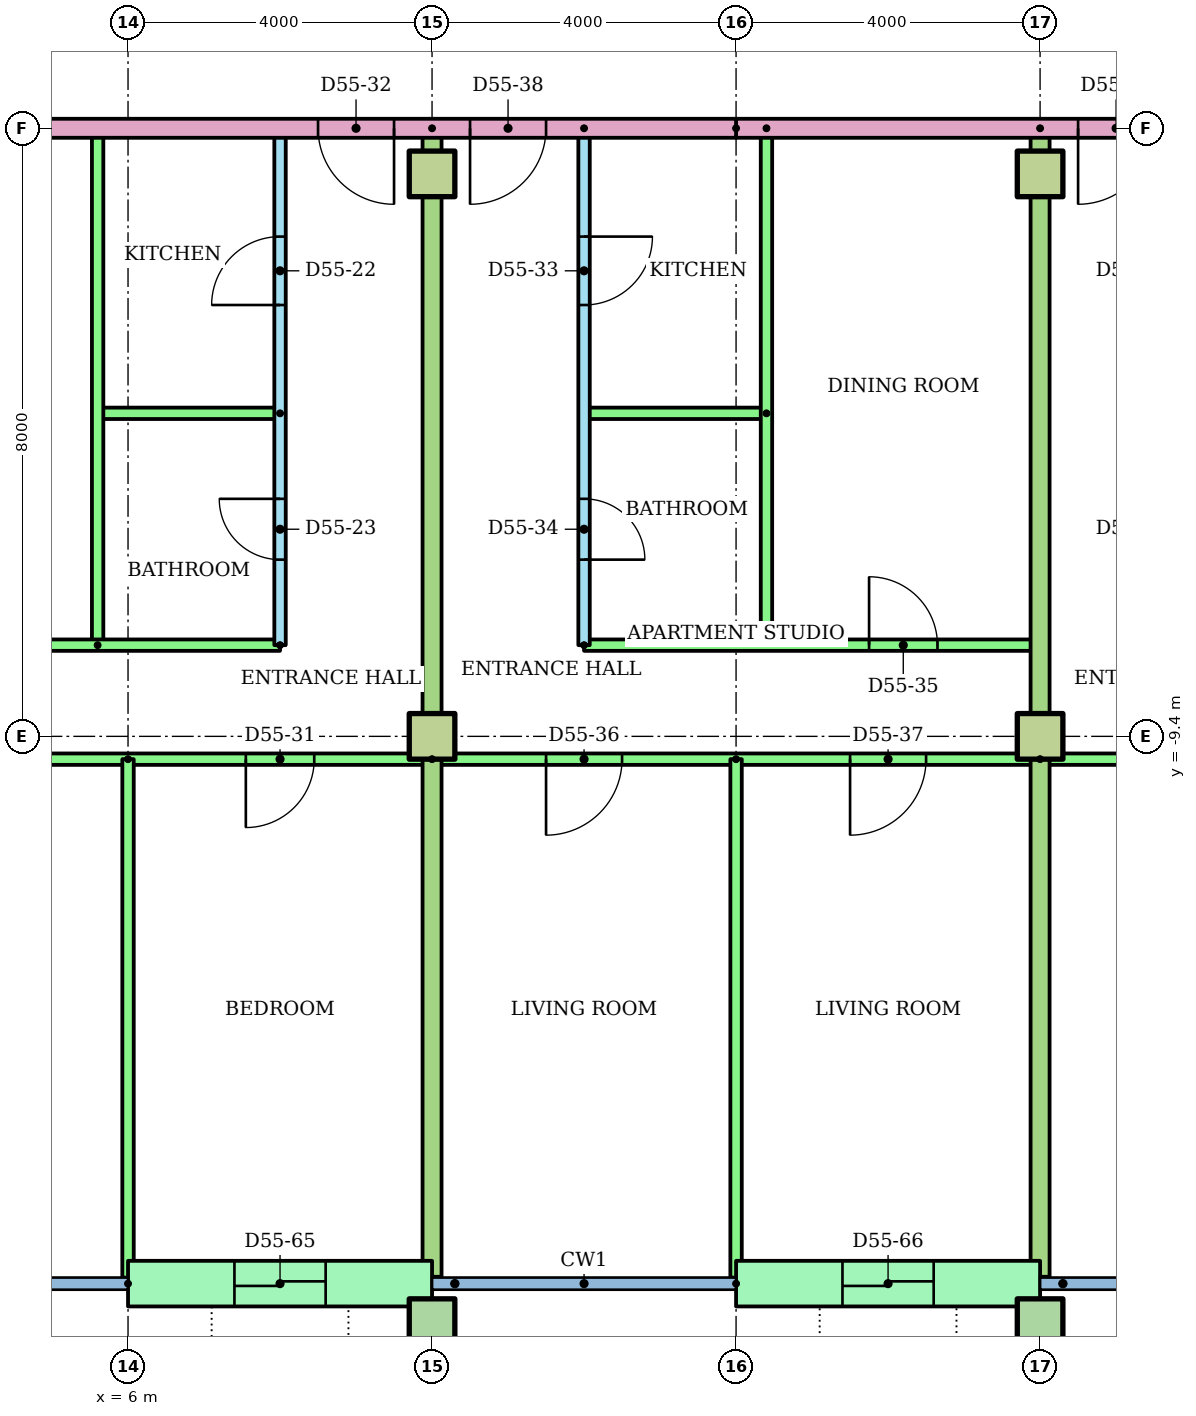
"""IFC4 building model, lengths in metres.
Left out: names, types, materials, properties, quantities, classifications, styles, units other than length and angle.
Written with IfcOpenShell. Run it as: python <this file> out.ifc"""

import sys

from ifc_helpers import new_model, si_unit, direction, frame, frame_2d, origin, origin_2d, place, context, subcontext, project, spatial, rectangle, hollow_rectangle, extrude, element, fill, save


model = new_model("IFC4")
c1 = context("Model", 3, precision=1e-05, world=origin(), true_north=direction((0.0, 1.0)))
c2 = subcontext(c1, "Body", "Model", "MODEL_VIEW")
j1 = project(units=[si_unit("LENGTHUNIT", "METRE"), si_unit("PLANEANGLEUNIT", "RADIAN")], contexts=[c1])
p1 = place(None, origin())
s1 = spatial("IfcSite", under=j1, at=p1, CompositionType="ELEMENT")
p2 = place(p1, origin())
s2 = spatial("IfcBuilding", under=s1, at=p2, CompositionType="ELEMENT")
p3 = place(p2, frame((0.0, 0.0, 214.0)))
s3 = spatial("IfcBuildingStorey", under=s2, at=p3, CompositionType="ELEMENT", Elevation=214.0)
for number, where in (
    (1, (10.0, -17.1, 0.0)),
    (2, (18.0, -17.1, 0.0)),
):
    element("IfcColumn", number, at=place(p3, frame(where)), inside=s3, PredefinedType="COLUMN", context=c2, shape_type="SweptSolid", body=[
        extrude(hollow_rectangle(XDim=0.6, YDim=0.6, WallThickness=0.03, at=origin_2d()), origin(), (0.0, 0.0, 1.0), 3.2),
    ])
for number, where in (
    (3, (10.0, -9.4, 0.0)),
    (4, (18.0, -9.4, 0.0)),
    (5, (10.0, -2.0, 0.0)),
    (6, (18.0, -2.0, 0.0)),
):
    element("IfcColumn", number, at=place(p3, frame(where)), inside=s3, PredefinedType="COLUMN", context=c2, shape_type="SweptSolid", body=[
        extrude(rectangle(XDim=0.6, YDim=0.6, at=origin_2d()), origin(), (0.0, 0.0, 1.0), 3.2),
    ])
p4 = place(p3, frame((6.0, -16.6, 0.0)))
e7 = element("IfcWall", 7, at=p4, inside=s3, PredefinedType="STANDARD", context=c2, shape_type="SweptSolid", body=[
    extrude(rectangle(XDim=4.0, YDim=0.6, at=frame_2d((2.0, 0.0))), origin(), (0.0, 0.0, 1.0), 2.92),
])
p5 = place(p4, frame((1.4, 0.0, 0.0)))
e8 = element("IfcOpeningElement", 8, at=p5, cuts=e7, PredefinedType="OPENING", context=c2, shape_type="SweptSolid", body=[
    extrude(rectangle(XDim=1.2, YDim=2.1, at=frame_2d((0.6, 1.05))), frame((0.0, 0.31, 0.0), z_axis=(0.0, -1.0, 0.0), x_axis=(1.0, 0.0, 0.0)), (0.0, 0.0, 1.0), 0.62),
])
p6 = place(p3, frame((14.0, -16.6, 0.0)))
e9 = element("IfcWall", 9, at=p6, inside=s3, PredefinedType="STANDARD", context=c2, shape_type="SweptSolid", body=[
    extrude(rectangle(XDim=4.0, YDim=0.6, at=frame_2d((2.0, 0.0))), origin(), (0.0, 0.0, 1.0), 2.92),
])
p7 = place(p6, frame((1.4, 0.0, 0.0)))
e10 = element("IfcOpeningElement", 10, at=p7, cuts=e9, PredefinedType="OPENING", context=c2, shape_type="SweptSolid", body=[
    extrude(rectangle(XDim=1.2, YDim=2.1, at=frame_2d((0.6, 1.05))), frame((0.0, 0.31, 0.0), z_axis=(0.0, -1.0, 0.0), x_axis=(1.0, 0.0, 0.0)), (0.0, 0.0, 1.0), 0.62),
])
p8 = place(p3, frame((8.0, -8.2, 0.0), z_axis=(0.0, 0.0, 1.0), x_axis=(0.0, 1.0, 0.0)))
e11 = element("IfcWall", 11, at=p8, inside=s3, PredefinedType="PARTITIONING", context=c2, shape_type="SweptSolid", body=[
    extrude(rectangle(XDim=6.8, YDim=0.15, at=frame_2d((3.4, 0.0))), origin(), (0.0, 0.0, 1.0), 2.4),
])
p9 = place(p8, frame((4.475, 0.0, 0.0)))
e12 = element("IfcOpeningElement", 12, at=p9, cuts=e11, PredefinedType="OPENING", context=c2, shape_type="SweptSolid", body=[
    extrude(rectangle(XDim=0.9, YDim=2.1, at=frame_2d((0.45, 1.05))), frame((0.0, 0.085, 0.0), z_axis=(0.0, -1.0, 0.0), x_axis=(1.0, 0.0, 0.0)), (0.0, 0.0, 1.0), 0.17),
])
p10 = place(p8, frame((1.125, 0.0, 0.0)))
e13 = element("IfcOpeningElement", 13, at=p10, cuts=e11, PredefinedType="OPENING", context=c2, shape_type="SweptSolid", body=[
    extrude(rectangle(XDim=0.8, YDim=2.1, at=frame_2d((0.4, 1.05))), frame((0.0, 0.085, 0.0), z_axis=(0.0, -1.0, 0.0), x_axis=(1.0, 0.0, 0.0)), (0.0, 0.0, 1.0), 0.17),
])
p11 = place(p3, frame((8.0, -5.15, 0.0), z_axis=(0.0, 0.0, 1.0), x_axis=(-1.0, 0.0, 0.0)))
e14 = element("IfcWall", 14, at=p11, inside=s3, PredefinedType="PARTITIONING", context=c2, shape_type="SweptSolid", body=[
    extrude(rectangle(XDim=2.4, YDim=0.15, at=frame_2d((1.2, 0.0))), origin(), (0.0, 0.0, 1.0), 2.4),
])
p12 = place(p3, frame((5.6, -8.2, 0.0), z_axis=(0.0, 0.0, 1.0), x_axis=(0.0, 1.0, 0.0)))
e15 = element("IfcWall", 15, at=p12, inside=s3, PredefinedType="PARTITIONING", context=c2, shape_type="SweptSolid", body=[
    extrude(rectangle(XDim=6.8, YDim=0.15, at=frame_2d((3.4, 0.0))), origin(), (0.0, 0.0, 1.0), 2.4),
])
p13 = place(p3, frame((-14.0, -8.2, 0.0)))
e16 = element("IfcWall", 16, at=p13, inside=s3, PredefinedType="PARTITIONING", context=c2, shape_type="SweptSolid", body=[
    extrude(rectangle(XDim=22.0, YDim=0.15, at=frame_2d((11.0, 0.0))), origin(), (0.0, 0.0, 1.0), 2.4),
])
p14 = place(p13, frame((14.624, 0.0, 0.0)))
e17 = element("IfcOpeningElement", 17, at=p14, cuts=e16, PredefinedType="OPENING", context=c2, shape_type="SweptSolid", body=[
    extrude(rectangle(XDim=0.9, YDim=2.1, at=frame_2d((0.45, 1.05))), frame((0.0, 0.085, 0.0), z_axis=(0.0, -1.0, 0.0), x_axis=(1.0, 0.0, 0.0)), (0.0, 0.0, 1.0), 0.17),
])
p15 = place(p13, frame((8.476, 0.0, 0.0)))
e18 = element("IfcOpeningElement", 18, at=p15, cuts=e16, PredefinedType="OPENING", context=c2, shape_type="SweptSolid", body=[
    extrude(rectangle(XDim=0.9, YDim=2.1, at=frame_2d((0.45, 1.05))), frame((0.0, 0.085, 0.0), z_axis=(0.0, -1.0, 0.0), x_axis=(1.0, 0.0, 0.0)), (0.0, 0.0, 1.0), 0.17),
])
p16 = place(p13, frame((1.975, 0.0, 0.0)))
e19 = element("IfcOpeningElement", 19, at=p16, cuts=e16, PredefinedType="OPENING", context=c2, shape_type="SweptSolid", body=[
    extrude(rectangle(XDim=0.9, YDim=2.1, at=frame_2d((0.45, 1.05))), frame((0.0, 0.085, 0.0), z_axis=(0.0, -1.0, 0.0), x_axis=(1.0, 0.0, 0.0)), (0.0, 0.0, 1.0), 0.17),
])
p17 = place(p3, frame((10.0, -9.7, 0.0), z_axis=(0.0, 0.0, 1.0), x_axis=(-1.0, 0.0, 0.0)))
e20 = element("IfcWall", 20, at=p17, inside=s3, PredefinedType="PARTITIONING", context=c2, shape_type="SweptSolid", body=[
    extrude(rectangle(XDim=24.0, YDim=0.15, at=frame_2d((12.0, 0.0))), origin(), (0.0, 0.0, 1.0), 2.4),
])
p18 = place(p17, frame((21.55, 0.0, 0.0)))
e21 = element("IfcOpeningElement", 21, at=p18, cuts=e20, PredefinedType="OPENING", context=c2, shape_type="SweptSolid", body=[
    extrude(rectangle(XDim=0.9, YDim=2.1, at=frame_2d((0.45, 1.05))), frame((0.0, 0.085, 0.0), z_axis=(0.0, -1.0, 0.0), x_axis=(1.0, 0.0, 0.0)), (0.0, 0.0, 1.0), 0.17),
])
p19 = place(p17, frame((17.55, 0.0, 0.0)))
e22 = element("IfcOpeningElement", 22, at=p19, cuts=e20, PredefinedType="OPENING", context=c2, shape_type="SweptSolid", body=[
    extrude(rectangle(XDim=0.9, YDim=2.1, at=frame_2d((0.45, 1.05))), frame((0.0, 0.085, 0.0), z_axis=(0.0, -1.0, 0.0), x_axis=(1.0, 0.0, 0.0)), (0.0, 0.0, 1.0), 0.17),
])
p20 = place(p17, frame((11.5, 0.0, 0.0)))
e23 = element("IfcOpeningElement", 23, at=p20, cuts=e20, PredefinedType="OPENING", context=c2, shape_type="SweptSolid", body=[
    extrude(rectangle(XDim=1.0, YDim=2.1, at=frame_2d((0.5, 1.05))), frame((0.0, 0.085, 0.0), z_axis=(0.0, -1.0, 0.0), x_axis=(1.0, 0.0, 0.0)), (0.0, 0.0, 1.0), 0.17),
])
p21 = place(p17, frame((5.55, 0.0, 0.0)))
e24 = element("IfcOpeningElement", 24, at=p21, cuts=e20, PredefinedType="OPENING", context=c2, shape_type="SweptSolid", body=[
    extrude(rectangle(XDim=0.9, YDim=2.1, at=frame_2d((0.45, 1.05))), frame((0.0, 0.085, 0.0), z_axis=(0.0, -1.0, 0.0), x_axis=(1.0, 0.0, 0.0)), (0.0, 0.0, 1.0), 0.17),
])
p22 = place(p17, frame((1.55, 0.0, 0.0)))
e25 = element("IfcOpeningElement", 25, at=p22, cuts=e20, PredefinedType="OPENING", context=c2, shape_type="SweptSolid", body=[
    extrude(rectangle(XDim=0.9, YDim=2.1, at=frame_2d((0.45, 1.05))), frame((0.0, 0.085, 0.0), z_axis=(0.0, -1.0, 0.0), x_axis=(1.0, 0.0, 0.0)), (0.0, 0.0, 1.0), 0.17),
])
p23 = place(p3, frame((6.0, -9.7, 0.0), z_axis=(0.0, 0.0, 1.0), x_axis=(0.0, -1.0, 0.0)))
e26 = element("IfcWall", 26, at=p23, inside=s3, PredefinedType="PARTITIONING", context=c2, shape_type="SweptSolid", body=[
    extrude(rectangle(XDim=6.821, YDim=0.15, at=frame_2d((3.411, 0.0))), origin(), (0.0, 0.0, 1.0), 2.4),
])
p24 = place(p3, frame((12.0, -1.4, 0.0), z_axis=(0.0, 0.0, 1.0), x_axis=(0.0, -1.0, 0.0)))
e27 = element("IfcWall", 27, at=p24, inside=s3, PredefinedType="PARTITIONING", context=c2, shape_type="SweptSolid", body=[
    extrude(rectangle(XDim=6.8, YDim=0.15, at=frame_2d((3.4, 0.0))), origin(), (0.0, 0.0, 1.0), 2.4),
])
p25 = place(p24, frame((1.425, 0.0, 0.0)))
e28 = element("IfcOpeningElement", 28, at=p25, cuts=e27, PredefinedType="OPENING", context=c2, shape_type="SweptSolid", body=[
    extrude(rectangle(XDim=0.9, YDim=2.1, at=frame_2d((0.45, 1.05))), frame((0.0, 0.085, 0.0), z_axis=(0.0, -1.0, 0.0), x_axis=(1.0, 0.0, 0.0)), (0.0, 0.0, 1.0), 0.17),
])
p26 = place(p24, frame((4.875, 0.0, 0.0)))
e29 = element("IfcOpeningElement", 29, at=p26, cuts=e27, PredefinedType="OPENING", context=c2, shape_type="SweptSolid", body=[
    extrude(rectangle(XDim=0.8, YDim=2.1, at=frame_2d((0.4, 1.05))), frame((0.0, 0.085, 0.0), z_axis=(0.0, -1.0, 0.0), x_axis=(1.0, 0.0, 0.0)), (0.0, 0.0, 1.0), 0.17),
])
p27 = place(p3, frame((14.4, -5.15, 0.0), z_axis=(0.0, 0.0, 1.0), x_axis=(-1.0, 0.0, 0.0)))
e30 = element("IfcWall", 30, at=p27, inside=s3, PredefinedType="PARTITIONING", context=c2, shape_type="SweptSolid", body=[
    extrude(rectangle(XDim=2.4, YDim=0.15, at=frame_2d((1.2, 0.0))), origin(), (0.0, 0.0, 1.0), 2.4),
])
p28 = place(p3, frame((14.4, -1.4, 0.0), z_axis=(0.0, 0.0, 1.0), x_axis=(0.0, -1.0, 0.0)))
e31 = element("IfcWall", 31, at=p28, inside=s3, PredefinedType="PARTITIONING", context=c2, shape_type="SweptSolid", body=[
    extrude(rectangle(XDim=6.8, YDim=0.15, at=frame_2d((3.4, 0.0))), origin(), (0.0, 0.0, 1.0), 2.4),
])
p29 = place(p3, frame((12.0, -8.2, 0.0)))
e32 = element("IfcWall", 32, at=p29, inside=s3, PredefinedType="PARTITIONING", context=c2, shape_type="SweptSolid", body=[
    extrude(rectangle(XDim=6.0, YDim=0.15, at=frame_2d((3.0, 0.0))), origin(), (0.0, 0.0, 1.0), 2.4),
])
p30 = place(p29, frame((3.75, 0.0, 0.0)))
e33 = element("IfcOpeningElement", 33, at=p30, cuts=e32, PredefinedType="OPENING", context=c2, shape_type="SweptSolid", body=[
    extrude(rectangle(XDim=0.9, YDim=2.1, at=frame_2d((0.45, 1.05))), frame((0.0, 0.085, 0.0), z_axis=(0.0, -1.0, 0.0), x_axis=(1.0, 0.0, 0.0)), (0.0, 0.0, 1.0), 0.17),
])
p31 = place(p3, frame((18.0, -9.7, 0.0), z_axis=(0.0, 0.0, 1.0), x_axis=(-1.0, 0.0, 0.0)))
e34 = element("IfcWall", 34, at=p31, inside=s3, PredefinedType="PARTITIONING", context=c2, shape_type="SweptSolid", body=[
    extrude(rectangle(XDim=8.0, YDim=0.15, at=frame_2d((4.0, 0.0))), origin(), (0.0, 0.0, 1.0), 2.4),
])
p32 = place(p31, frame((5.5, 0.0, 0.0)))
e35 = element("IfcOpeningElement", 35, at=p32, cuts=e34, PredefinedType="OPENING", context=c2, shape_type="SweptSolid", body=[
    extrude(rectangle(XDim=1.0, YDim=2.1, at=frame_2d((0.5, 1.05))), frame((0.0, 0.085, 0.0), z_axis=(0.0, -1.0, 0.0), x_axis=(1.0, 0.0, 0.0)), (0.0, 0.0, 1.0), 0.17),
])
p33 = place(p31, frame((1.5, 0.0, 0.0)))
e36 = element("IfcOpeningElement", 36, at=p33, cuts=e34, PredefinedType="OPENING", context=c2, shape_type="SweptSolid", body=[
    extrude(rectangle(XDim=1.0, YDim=2.1, at=frame_2d((0.5, 1.05))), frame((0.0, 0.085, 0.0), z_axis=(0.0, -1.0, 0.0), x_axis=(1.0, 0.0, 0.0)), (0.0, 0.0, 1.0), 0.17),
])
p34 = place(p3, frame((14.0, -9.7, 0.0), z_axis=(0.0, 0.0, 1.0), x_axis=(0.0, -1.0, 0.0)))
e37 = element("IfcWall", 37, at=p34, inside=s3, PredefinedType="PARTITIONING", context=c2, shape_type="SweptSolid", body=[
    extrude(rectangle(XDim=6.821, YDim=0.15, at=frame_2d((3.411, 0.0))), origin(), (0.0, 0.0, 1.0), 2.4),
])
p35 = place(p3, frame((10.0, -1.4, 0.0), z_axis=(0.0, 0.0, 1.0), x_axis=(0.0, -1.0, 0.0)))
e38 = element("IfcWall", 38, at=p35, inside=s3, PredefinedType="PARTITIONING", context=c2, shape_type="SweptSolid", body=[
    extrude(rectangle(XDim=15.11, YDim=0.25, at=frame_2d((7.555, 0.0))), origin(), (0.0, 0.0, 1.0), 2.4),
])
p36 = place(p3, frame((28.92, -9.7, 0.0), z_axis=(0.0, 0.0, 1.0), x_axis=(-1.0, 0.0, 0.0)))
e39 = element("IfcWall", 39, at=p36, inside=s3, PredefinedType="PARTITIONING", context=c2, shape_type="SweptSolid", body=[
    extrude(rectangle(XDim=10.92, YDim=0.15, at=frame_2d((5.46, 0.0))), origin(), (0.0, 0.0, 1.0), 2.4),
])
p37 = place(p36, frame((7.32, 0.0, 0.0)))
e40 = element("IfcOpeningElement", 40, at=p37, cuts=e39, PredefinedType="OPENING", context=c2, shape_type="SweptSolid", body=[
    extrude(rectangle(XDim=1.0, YDim=2.1, at=frame_2d((0.5, 1.05))), frame((0.0, 0.085, 0.0), z_axis=(0.0, -1.0, 0.0), x_axis=(1.0, 0.0, 0.0)), (0.0, 0.0, 1.0), 0.17),
])
p38 = place(p36, frame((1.444, 0.0, 0.0)))
e41 = element("IfcOpeningElement", 41, at=p38, cuts=e39, PredefinedType="OPENING", context=c2, shape_type="SweptSolid", body=[
    extrude(rectangle(XDim=1.0, YDim=2.1, at=frame_2d((0.5, 1.05))), frame((0.0, 0.085, 0.0), z_axis=(0.0, -1.0, 0.0), x_axis=(1.0, 0.0, 0.0)), (0.0, 0.0, 1.0), 0.17),
])
p39 = place(p3, frame((18.0, -1.4, 0.0), z_axis=(0.0, 0.0, 1.0), x_axis=(0.0, -1.0, 0.0)))
e42 = element("IfcWall", 42, at=p39, inside=s3, PredefinedType="PARTITIONING", context=c2, shape_type="SweptSolid", body=[
    extrude(rectangle(XDim=15.11, YDim=0.25, at=frame_2d((7.555, 0.0))), origin(), (0.0, 0.0, 1.0), 2.4),
])
p40 = place(p3, frame((28.92, -1.4, 0.0), z_axis=(0.0, 0.0, 1.0), x_axis=(-1.0, 0.0, 0.0)))
e43 = element("IfcWall", 43, at=p40, inside=s3, PredefinedType="PARTITIONING", context=c2, shape_type="SweptSolid", body=[
    extrude(rectangle(XDim=14.92, YDim=0.25, at=frame_2d((7.46, 0.0))), origin(), (0.0, 0.0, 1.0), 2.4),
])
p41 = place(p40, frame((9.42, 0.0, 0.0)))
e44 = element("IfcOpeningElement", 44, at=p41, cuts=e43, PredefinedType="OPENING", context=c2, shape_type="SweptSolid", body=[
    extrude(rectangle(XDim=1.0, YDim=2.1, at=frame_2d((0.5, 1.05))), frame((0.0, 0.135, 0.0), z_axis=(0.0, -1.0, 0.0), x_axis=(1.0, 0.0, 0.0)), (0.0, 0.0, 1.0), 0.27),
])
p42 = place(p3, frame((14.0, -1.4, 0.0), z_axis=(0.0, 0.0, 1.0), x_axis=(-1.0, 0.0, 0.0)))
e45 = element("IfcWall", 45, at=p42, inside=s3, PredefinedType="PARTITIONING", context=c2, shape_type="SweptSolid", body=[
    extrude(rectangle(XDim=28.0, YDim=0.25, at=frame_2d((14.0, 0.0))), origin(), (0.0, 0.0, 1.0), 2.4),
])
p43 = place(p42, frame((4.5, 0.0, 0.0)))
e46 = element("IfcOpeningElement", 46, at=p43, cuts=e45, PredefinedType="OPENING", context=c2, shape_type="SweptSolid", body=[
    extrude(rectangle(XDim=1.0, YDim=2.1, at=frame_2d((0.5, 1.05))), frame((0.0, 0.135, 0.0), z_axis=(0.0, -1.0, 0.0), x_axis=(1.0, 0.0, 0.0)), (0.0, 0.0, 1.0), 0.27),
])
p44 = place(p42, frame((2.5, 0.0, 0.0)))
e47 = element("IfcOpeningElement", 47, at=p44, cuts=e45, PredefinedType="OPENING", context=c2, shape_type="SweptSolid", body=[
    extrude(rectangle(XDim=1.0, YDim=2.1, at=frame_2d((0.5, 1.05))), frame((0.0, 0.135, 0.0), z_axis=(0.0, -1.0, 0.0), x_axis=(1.0, 0.0, 0.0)), (0.0, 0.0, 1.0), 0.27),
])
p45 = place(p9, origin())
e48 = element("IfcDoor", 48, at=p45, inside=s3, OperationType="SINGLE_SWING_LEFT", PredefinedType="DOOR", context=c2, shape_type="SweptSolid", body=[
    extrude(rectangle(XDim=0.9, YDim=2.1, at=frame_2d((0.45, 1.05))), frame((0.0, 0.025, 0.0), z_axis=(0.0, -1.0, 0.0), x_axis=(1.0, 0.0, 0.0)), (0.0, 0.0, 1.0), 0.05),
])
fill(e12, e48)
p46 = place(p10, origin())
e49 = element("IfcDoor", 49, at=p46, inside=s3, OperationType="SINGLE_SWING_RIGHT", PredefinedType="DOOR", context=c2, shape_type="SweptSolid", body=[
    extrude(rectangle(XDim=0.8, YDim=2.1, at=frame_2d((0.4, 1.05))), frame((0.0, 0.025, 0.0), z_axis=(0.0, -1.0, 0.0), x_axis=(1.0, 0.0, 0.0)), (0.0, 0.0, 1.0), 0.05),
])
fill(e13, e49)
p47 = place(p22, origin())
e50 = element("IfcDoor", 50, at=p47, inside=s3, OperationType="SINGLE_SWING_RIGHT", PredefinedType="DOOR", context=c2, shape_type="SweptSolid", body=[
    extrude(rectangle(XDim=0.9, YDim=2.1, at=frame_2d((0.45, 1.05))), frame((0.0, 0.025, 0.0), z_axis=(0.0, -1.0, 0.0), x_axis=(1.0, 0.0, 0.0)), (0.0, 0.0, 1.0), 0.05),
])
fill(e25, e50)
p48 = place(p43, origin())
e51 = element("IfcDoor", 51, at=p48, inside=s3, OperationType="SINGLE_SWING_LEFT", PredefinedType="DOOR", context=c2, shape_type="SweptSolid", body=[
    extrude(rectangle(XDim=1.0, YDim=2.1, at=frame_2d((0.5, 1.05))), frame((0.0, 0.025, 0.0), z_axis=(0.0, -1.0, 0.0), x_axis=(1.0, 0.0, 0.0)), (0.0, 0.0, 1.0), 0.05),
])
fill(e46, e51)
p49 = place(p25, origin())
e52 = element("IfcDoor", 52, at=p49, inside=s3, OperationType="SINGLE_SWING_LEFT", PredefinedType="DOOR", context=c2, shape_type="SweptSolid", body=[
    extrude(rectangle(XDim=0.9, YDim=2.1, at=frame_2d((0.45, 1.05))), frame((0.0, 0.025, 0.0), z_axis=(0.0, -1.0, 0.0), x_axis=(1.0, 0.0, 0.0)), (0.0, 0.0, 1.0), 0.05),
])
fill(e28, e52)
p50 = place(p26, origin())
e53 = element("IfcDoor", 53, at=p50, inside=s3, OperationType="SINGLE_SWING_RIGHT", PredefinedType="DOOR", context=c2, shape_type="SweptSolid", body=[
    extrude(rectangle(XDim=0.8, YDim=2.1, at=frame_2d((0.4, 1.05))), frame((0.0, 0.025, 0.0), z_axis=(0.0, -1.0, 0.0), x_axis=(1.0, 0.0, 0.0)), (0.0, 0.0, 1.0), 0.05),
])
fill(e29, e53)
p51 = place(p30, origin())
e54 = element("IfcDoor", 54, at=p51, inside=s3, OperationType="SINGLE_SWING_LEFT", PredefinedType="DOOR", context=c2, shape_type="SweptSolid", body=[
    extrude(rectangle(XDim=0.9, YDim=2.1, at=frame_2d((0.45, 1.05))), frame((0.0, 0.025, 0.0), z_axis=(0.0, -1.0, 0.0), x_axis=(1.0, 0.0, 0.0)), (0.0, 0.0, 1.0), 0.05),
])
fill(e33, e54)
p52 = place(p32, origin())
e55 = element("IfcDoor", 55, at=p52, inside=s3, OperationType="SINGLE_SWING_RIGHT", PredefinedType="DOOR", context=c2, shape_type="SweptSolid", body=[
    extrude(rectangle(XDim=1.0, YDim=2.1, at=frame_2d((0.5, 1.05))), frame((0.0, 0.025, 0.0), z_axis=(0.0, -1.0, 0.0), x_axis=(1.0, 0.0, 0.0)), (0.0, 0.0, 1.0), 0.05),
])
fill(e35, e55)
p53 = place(p33, origin())
e56 = element("IfcDoor", 56, at=p53, inside=s3, OperationType="SINGLE_SWING_RIGHT", PredefinedType="DOOR", context=c2, shape_type="SweptSolid", body=[
    extrude(rectangle(XDim=1.0, YDim=2.1, at=frame_2d((0.5, 1.05))), frame((0.0, 0.025, 0.0), z_axis=(0.0, -1.0, 0.0), x_axis=(1.0, 0.0, 0.0)), (0.0, 0.0, 1.0), 0.05),
])
fill(e36, e56)
p54 = place(p44, origin())
e57 = element("IfcDoor", 57, at=p54, inside=s3, OperationType="SINGLE_SWING_RIGHT", PredefinedType="DOOR", context=c2, shape_type="SweptSolid", body=[
    extrude(rectangle(XDim=1.0, YDim=2.1, at=frame_2d((0.5, 1.05))), frame((0.0, 0.025, 0.0), z_axis=(0.0, -1.0, 0.0), x_axis=(1.0, 0.0, 0.0)), (0.0, 0.0, 1.0), 0.05),
])
fill(e47, e57)
p55 = place(p41, origin())
e58 = element("IfcDoor", 58, at=p55, inside=s3, OperationType="SINGLE_SWING_RIGHT", PredefinedType="DOOR", context=c2, shape_type="SweptSolid", body=[
    extrude(rectangle(XDim=1.0, YDim=2.1, at=frame_2d((0.5, 1.05))), frame((0.0, 0.025, 0.0), z_axis=(0.0, -1.0, 0.0), x_axis=(1.0, 0.0, 0.0)), (0.0, 0.0, 1.0), 0.05),
])
fill(e44, e58)
p56 = place(p5, origin())
e59 = element("IfcDoor", 59, at=p56, inside=s3, OperationType="SLIDING_TO_LEFT", PredefinedType="DOOR", context=c2, shape_type="SweptSolid", body=[
    extrude(rectangle(XDim=1.2, YDim=2.1, at=frame_2d((0.6, 1.05))), frame((0.0, 0.025, 0.0), z_axis=(0.0, -1.0, 0.0), x_axis=(1.0, 0.0, 0.0)), (0.0, 0.0, 1.0), 0.05),
])
fill(e8, e59)
p57 = place(p7, origin())
e60 = element("IfcDoor", 60, at=p57, inside=s3, OperationType="SLIDING_TO_LEFT", PredefinedType="DOOR", context=c2, shape_type="SweptSolid", body=[
    extrude(rectangle(XDim=1.2, YDim=2.1, at=frame_2d((0.6, 1.05))), frame((0.0, 0.025, 0.0), z_axis=(0.0, -1.0, 0.0), x_axis=(1.0, 0.0, 0.0)), (0.0, 0.0, 1.0), 0.05),
])
fill(e10, e60)
save(model, sys.argv[1])
